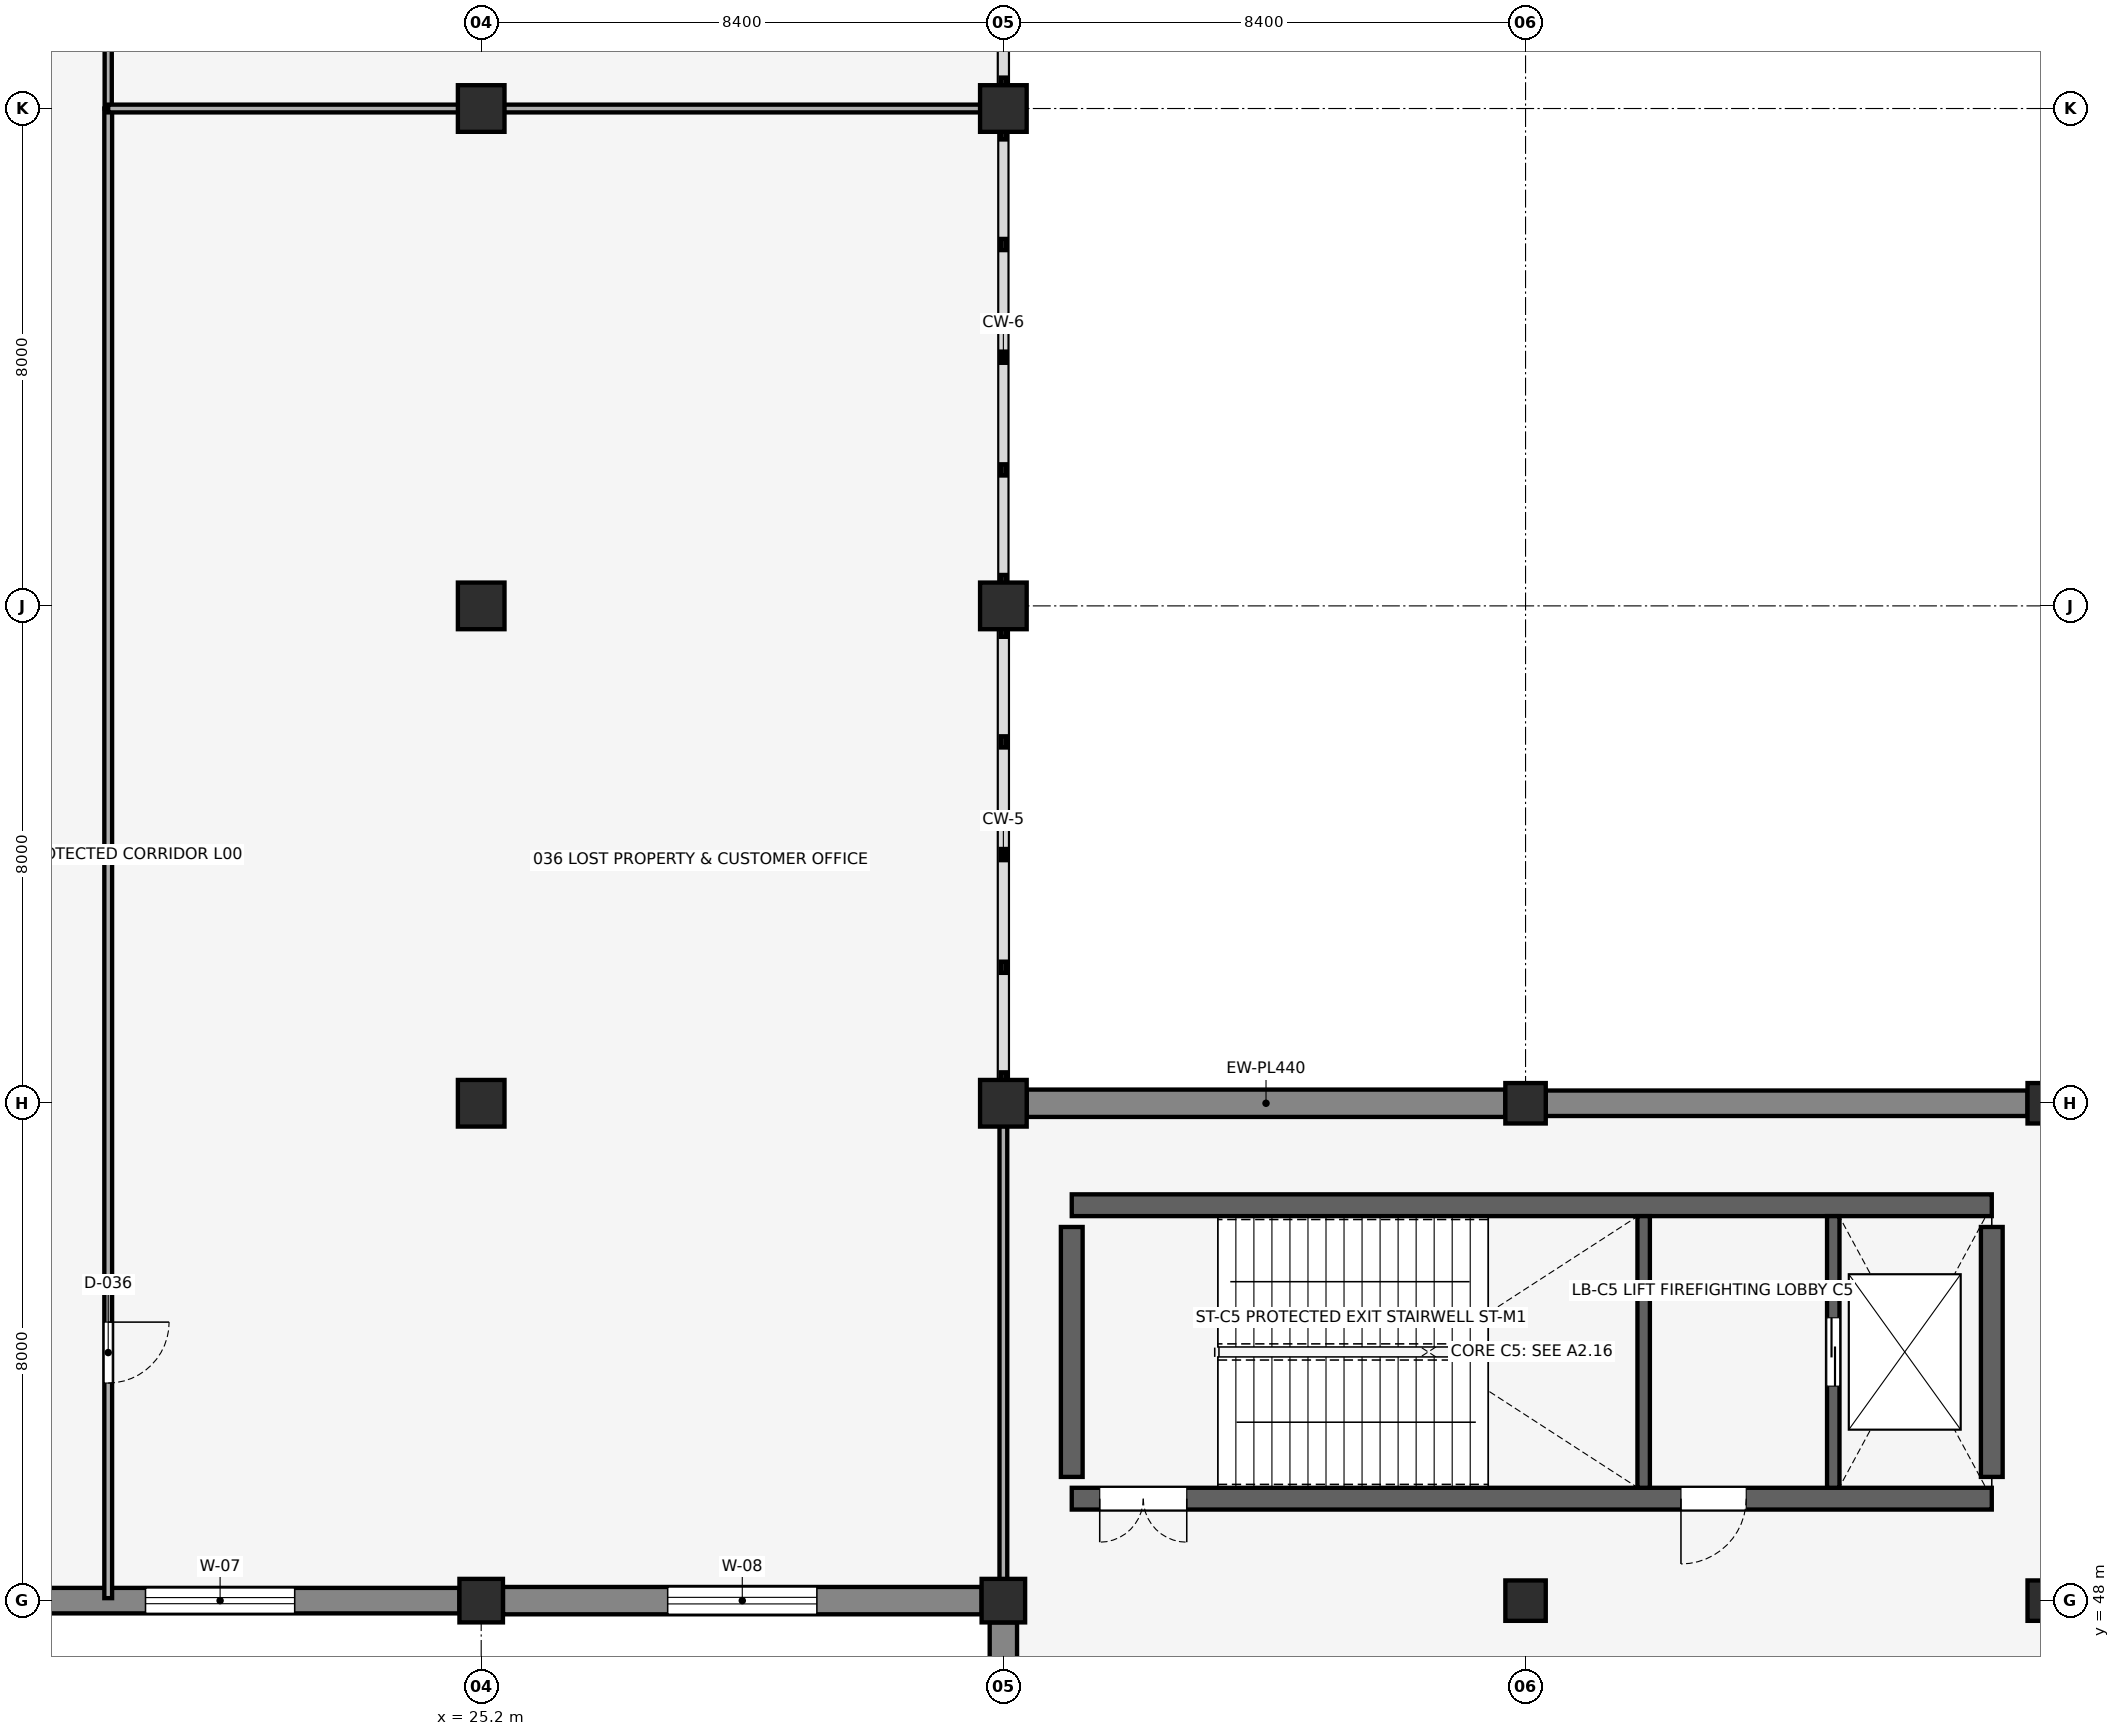
"""IFC4 building model, lengths in metres.
Left out: names, types, materials, properties, quantities, classifications, styles, units other than length and angle.
Written with IfcOpenShell. Run it as: python <this file> out.ifc"""

import sys

from ifc_helpers import new_model, si_unit, direction, frame, frame_2d, origin, origin_2d, place, context, subcontext, project, spatial, rectangle, circle, extrude, element, fill, save


model = new_model("IFC4")
c1 = context("Model", 3, precision=1e-05, world=origin(), true_north=direction((0.0, 1.0)))
c2 = subcontext(c1, "Body", "Model", "MODEL_VIEW")
j1 = project(units=[si_unit("LENGTHUNIT", "METRE"), si_unit("PLANEANGLEUNIT", "RADIAN")], contexts=[c1])
p1 = place(None, origin())
s1 = spatial("IfcSite", under=j1, at=p1, CompositionType="ELEMENT")
p2 = place(p1, origin())
s2 = spatial("IfcBuilding", under=s1, at=p2, CompositionType="ELEMENT")
p3 = place(p2, origin())
s3 = spatial("IfcBuildingStorey", under=s2, at=p3, CompositionType="ELEMENT", Elevation=0.0)
p4 = place(p3, frame((34.7, 49.64, 0.0), z_axis=(0.0, 0.0, 1.0), x_axis=(1.0, 0.0, 0.0)))
e1 = element("IfcWall", 1, at=p4, inside=s3, PredefinedType="SHEAR", context=c2, shape_type="SweptSolid", body=[
    extrude(rectangle(XDim=14.8, YDim=0.35, at=frame_2d((7.4, 0.0))), origin(), (0.0, 0.0, 1.0), 5.15),
])
p5 = place(p4, frame((1.85, 0.0, 0.0), z_axis=(0.0, 0.0, 1.0), x_axis=(-1.0, 0.0, 0.0)))
e2 = element("IfcOpeningElement", 2, at=p5, cuts=e1, PredefinedType="OPENING", context=c2, shape_type="SweptSolid", body=[
    extrude(rectangle(XDim=1.4, YDim=2.15, at=frame_2d((0.7, 1.075))), frame((0.0, 0.185, 0.0), z_axis=(0.0, -1.0, 0.0), x_axis=(1.0, 0.0, 0.0)), (0.0, 0.0, 1.0), 0.37),
])
p6 = place(p4, frame((10.85, 0.0, 0.0), z_axis=(0.0, 0.0, 1.0), x_axis=(-1.0, 0.0, 0.0)))
e3 = element("IfcOpeningElement", 3, at=p6, cuts=e1, PredefinedType="OPENING", context=c2, shape_type="SweptSolid", body=[
    extrude(rectangle(XDim=1.05, YDim=2.15, at=frame_2d((0.525, 1.075))), frame((0.0, 0.185, 0.0), z_axis=(0.0, -1.0, 0.0), x_axis=(1.0, 0.0, 0.0)), (0.0, 0.0, 1.0), 0.37),
])
p7 = place(p3, frame((34.7, 54.36, 0.0), z_axis=(0.0, 0.0, 1.0), x_axis=(1.0, 0.0, 0.0)))
e4 = element("IfcWall", 4, at=p7, inside=s3, PredefinedType="SHEAR", context=c2, shape_type="SweptSolid", body=[
    extrude(rectangle(XDim=14.8, YDim=0.35, at=frame_2d((7.4, 0.0))), origin(), (0.0, 0.0, 1.0), 5.15),
])
for number, where, z_axis, x_axis in (
    (5, (34.7, 49.99, 0.0), (0.0, 0.0, 1.0), (0.0, 1.0, 0.0)),
    (6, (49.5, 49.99, 0.0), (0.0, 0.0, 1.0), (0.0, 1.0, 0.0)),
):
    element("IfcWall", number, at=place(p3, frame(where, z_axis=z_axis, x_axis=x_axis)), inside=s3, PredefinedType="SHEAR", context=c2, shape_type="SweptSolid", body=[
        extrude(rectangle(XDim=4.02, YDim=0.35, at=frame_2d((2.01, 0.0))), origin(), (0.0, 0.0, 1.0), 5.15),
    ])
p8 = place(p3, frame((25.2, 48.0, 0.0), z_axis=(0.0, 0.0, 1.0), x_axis=(1.0, 0.0, 0.0)))
e7 = element("IfcColumn", 7, at=p8, inside=s3, PredefinedType="COLUMN", context=c2, shape_type="SweptSolid", body=[
    extrude(rectangle(XDim=0.7, YDim=0.7, at=origin_2d()), origin(), (0.0, 0.0, 1.0), 5.15),
])
for number, where, z_axis, x_axis in (
    (8, (25.2, 56.0, 0.0), (0.0, 0.0, 1.0), (1.0, 0.0, 0.0)),
    (9, (25.2, 64.0, 0.0), (0.0, 0.0, 1.0), (1.0, 0.0, 0.0)),
    (10, (25.2, 72.0, 0.0), (0.0, 0.0, 1.0), (1.0, 0.0, 0.0)),
):
    element("IfcColumn", number, at=place(p3, frame(where, z_axis=z_axis, x_axis=x_axis)), inside=s3, PredefinedType="COLUMN", context=c2, shape_type="SweptSolid", body=[
        extrude(rectangle(XDim=0.75, YDim=0.75, at=origin_2d()), origin(), (0.0, 0.0, 1.0), 5.15),
    ])
p9 = place(p3, frame((33.6, 48.0, 0.0), z_axis=(0.0, 0.0, 1.0), x_axis=(1.0, 0.0, 0.0)))
e11 = element("IfcColumn", 11, at=p9, inside=s3, PredefinedType="COLUMN", context=c2, shape_type="SweptSolid", body=[
    extrude(rectangle(XDim=0.7, YDim=0.7, at=origin_2d()), origin(), (0.0, 0.0, 1.0), 5.15),
])
for number, where, z_axis, x_axis in (
    (12, (33.6, 56.0, 0.0), (0.0, 0.0, 1.0), (1.0, 0.0, 0.0)),
    (13, (33.6, 64.0, 0.0), (0.0, 0.0, 1.0), (1.0, 0.0, 0.0)),
    (14, (33.6, 72.0, 0.0), (0.0, 0.0, 1.0), (1.0, 0.0, 0.0)),
):
    element("IfcColumn", number, at=place(p3, frame(where, z_axis=z_axis, x_axis=x_axis)), inside=s3, PredefinedType="COLUMN", context=c2, shape_type="SweptSolid", body=[
        extrude(rectangle(XDim=0.75, YDim=0.75, at=origin_2d()), origin(), (0.0, 0.0, 1.0), 5.15),
    ])
for number, where, z_axis, x_axis in (
    (15, (42.0, 48.0, 0.0), (0.0, 0.0, 1.0), (1.0, 0.0, 0.0)),
    (16, (42.0, 56.0, 0.0), (0.0, 0.0, 1.0), (1.0, 0.0, 0.0)),
    (17, (50.4, 48.0, 0.0), (0.0, 0.0, 1.0), (1.0, 0.0, 0.0)),
    (18, (50.4, 56.0, 0.0), (0.0, 0.0, 1.0), (1.0, 0.0, 0.0)),
):
    element("IfcColumn", number, at=place(p3, frame(where, z_axis=z_axis, x_axis=x_axis)), inside=s3, PredefinedType="COLUMN", context=c2, shape_type="SweptSolid", body=[
        extrude(circle(Radius=0.325, at=origin_2d()), origin(), (0.0, 0.0, 1.0), 5.15),
    ])
p10 = place(p3, frame((33.6, 40.325, 0.0), z_axis=(0.0, 0.0, 1.0), x_axis=(0.0, 1.0, 0.0)))
e19 = element("IfcWall", 19, at=p10, inside=s3, PredefinedType="SOLIDWALL", context=c2, shape_type="SweptSolid", body=[
    extrude(rectangle(XDim=7.325, YDim=0.44, at=frame_2d((3.663, 0.0))), origin(), (0.0, 0.0, 1.0), 4.747),
])
p11 = place(p10, frame((2.163, 0.0, 0.9), z_axis=(0.0, 0.0, 1.0), x_axis=(1.0, 0.0, 0.0)))
e20 = element("IfcOpeningElement", 20, at=p11, cuts=e19, PredefinedType="OPENING", context=c2, shape_type="SweptSolid", body=[
    extrude(rectangle(XDim=3.0, YDim=1.65, at=frame_2d((1.5, 0.825))), frame((0.0, 0.23, 0.0), z_axis=(0.0, -1.0, 0.0), x_axis=(1.0, 0.0, 0.0)), (0.0, 0.0, 1.0), 0.46),
])
p12 = place(p3, frame((17.15, 48.0, 0.0), z_axis=(0.0, 0.0, 1.0), x_axis=(1.0, 0.0, 0.0)))
e21 = element("IfcWall", 21, at=p12, inside=s3, PredefinedType="SOLIDWALL", context=c2, shape_type="SweptSolid", body=[
    extrude(rectangle(XDim=7.7, YDim=0.41, at=frame_2d((3.85, 0.0))), origin(), (0.0, 0.0, 1.0), 4.74),
])
p13 = place(p12, frame((2.65, 0.0, 0.9), z_axis=(0.0, 0.0, 1.0), x_axis=(1.0, 0.0, 0.0)))
e22 = element("IfcOpeningElement", 22, at=p13, cuts=e21, PredefinedType="OPENING", context=c2, shape_type="SweptSolid", body=[
    extrude(rectangle(XDim=2.4, YDim=1.75, at=frame_2d((1.2, 0.875))), frame((0.0, 0.215, 0.0), z_axis=(0.0, -1.0, 0.0), x_axis=(1.0, 0.0, 0.0)), (0.0, 0.0, 1.0), 0.43),
])
p14 = place(p3, frame((25.55, 48.0, 0.0), z_axis=(0.0, 0.0, 1.0), x_axis=(1.0, 0.0, 0.0)))
e23 = element("IfcWall", 23, at=p14, inside=s3, PredefinedType="SOLIDWALL", context=c2, shape_type="SweptSolid", body=[
    extrude(rectangle(XDim=7.7, YDim=0.44, at=frame_2d((3.85, 0.0))), origin(), (0.0, 0.0, 1.0), 4.74),
])
p15 = place(p14, frame((2.65, 0.0, 0.9), z_axis=(0.0, 0.0, 1.0), x_axis=(1.0, 0.0, 0.0)))
e24 = element("IfcOpeningElement", 24, at=p15, cuts=e23, PredefinedType="OPENING", context=c2, shape_type="SweptSolid", body=[
    extrude(rectangle(XDim=2.4, YDim=1.5, at=frame_2d((1.2, 0.75))), frame((0.0, 0.23, 0.0), z_axis=(0.0, -1.0, 0.0), x_axis=(1.0, 0.0, 0.0)), (0.0, 0.0, 1.0), 0.46),
])
p16 = place(p3, frame((33.975, 56.0, 0.0), z_axis=(0.0, 0.0, 1.0), x_axis=(1.0, 0.0, 0.0)))
e25 = element("IfcWall", 25, at=p16, inside=s3, PredefinedType="SOLIDWALL", context=c2, shape_type="SweptSolid", body=[
    extrude(rectangle(XDim=7.7, YDim=0.44, at=frame_2d((3.85, 0.0))), origin(), (0.0, 0.0, 1.0), 4.74),
])
p17 = place(p3, frame((42.325, 56.0, 0.0), z_axis=(0.0, 0.0, 1.0), x_axis=(1.0, 0.0, 0.0)))
e26 = element("IfcWall", 26, at=p17, inside=s3, PredefinedType="SOLIDWALL", context=c2, shape_type="SweptSolid", body=[
    extrude(rectangle(XDim=7.75, YDim=0.41, at=frame_2d((3.875, 0.0))), origin(), (0.0, 0.0, 1.0), 4.74),
])
p18 = place(p3, frame((43.9, 49.815, 0.0), z_axis=(0.0, 0.0, 1.0), x_axis=(0.0, 1.0, 0.0)))
e27 = element("IfcWall", 27, at=p18, inside=s3, PredefinedType="SHEAR", context=c2, shape_type="SweptSolid", body=[
    extrude(rectangle(XDim=4.37, YDim=0.2, at=frame_2d((2.185, 0.0))), origin(), (0.0, 0.0, 1.0), 5.15),
])
p19 = place(p3, frame((46.95, 49.815, 0.0), z_axis=(0.0, 0.0, 1.0), x_axis=(0.0, 1.0, 0.0)))
e28 = element("IfcWall", 28, at=p19, inside=s3, PredefinedType="SHEAR", context=c2, shape_type="SweptSolid", body=[
    extrude(rectangle(XDim=4.37, YDim=0.2, at=frame_2d((2.185, 0.0))), origin(), (0.0, 0.0, 1.0), 5.15),
])
p20 = place(p19, frame((1.635, 0.0, 0.0), z_axis=(0.0, 0.0, 1.0), x_axis=(1.0, 0.0, 0.0)))
e29 = element("IfcOpeningElement", 29, at=p20, cuts=e28, PredefinedType="OPENING", context=c2, shape_type="SweptSolid", body=[
    extrude(rectangle(XDim=1.1, YDim=2.15, at=frame_2d((0.55, 1.075))), frame((0.0, 0.11, 0.0), z_axis=(0.0, -1.0, 0.0), x_axis=(1.0, 0.0, 0.0)), (0.0, 0.0, 1.0), 0.22),
])
p21 = place(p3, frame((19.2, 48.04, 0.0), z_axis=(0.0, 0.0, 1.0), x_axis=(0.0, 1.0, 0.0)))
e30 = element("IfcWall", 30, at=p21, inside=s3, PredefinedType="PARTITIONING", context=c2, shape_type="SweptSolid", body=[
    extrude(rectangle(XDim=23.96, YDim=0.125, at=frame_2d((11.98, 0.0))), origin(), (0.0, 0.0, 1.0), 5.15),
])
p22 = place(p21, frame((4.44, 0.0, 0.0), z_axis=(0.0, 0.0, 1.0), x_axis=(-1.0, 0.0, 0.0)))
e31 = element("IfcOpeningElement", 31, at=p22, cuts=e30, PredefinedType="OPENING", context=c2, shape_type="SweptSolid", body=[
    extrude(rectangle(XDim=0.98, YDim=2.15, at=frame_2d((0.49, 1.075))), frame((0.0, 0.073, 0.0), z_axis=(0.0, -1.0, 0.0), x_axis=(1.0, 0.0, 0.0)), (0.0, 0.0, 1.0), 0.145),
])
p23 = place(p3, frame((19.2, 72.0, 0.0), z_axis=(0.0, 0.0, 1.0), x_axis=(0.0, 1.0, 0.0)))
e32 = element("IfcWall", 32, at=p23, inside=s3, PredefinedType="PARTITIONING", context=c2, shape_type="SweptSolid", body=[
    extrude(rectangle(XDim=16.0, YDim=0.115, at=frame_2d((8.0, 0.0))), origin(), (0.0, 0.0, 1.0), 5.15),
])
p24 = place(p23, frame((4.45, 0.0, 0.0), z_axis=(0.0, 0.0, 1.0), x_axis=(-1.0, 0.0, 0.0)))
e33 = element("IfcOpeningElement", 33, at=p24, cuts=e32, PredefinedType="OPENING", context=c2, shape_type="SweptSolid", body=[
    extrude(rectangle(XDim=0.95, YDim=2.15, at=frame_2d((0.475, 1.075))), frame((0.0, 0.067, 0.0), z_axis=(0.0, -1.0, 0.0), x_axis=(1.0, 0.0, 0.0)), (0.0, 0.0, 1.0), 0.135),
])
p25 = place(p3, frame((33.6, 48.34, 0.0), z_axis=(0.0, 0.0, 1.0), x_axis=(0.0, 1.0, 0.0)))
e34 = element("IfcWall", 34, at=p25, inside=s3, PredefinedType="PARTITIONING", context=c2, shape_type="SweptSolid", body=[
    extrude(rectangle(XDim=7.295, YDim=0.125, at=frame_2d((3.647, 0.0))), origin(), (0.0, 0.0, 1.0), 4.542),
])
p26 = place(p3, frame((19.2, 72.0, 0.0), z_axis=(0.0, 0.0, 1.0), x_axis=(1.0, 0.0, 0.0)))
e35 = element("IfcWall", 35, at=p26, inside=s3, PredefinedType="PARTITIONING", context=c2, shape_type="SweptSolid", body=[
    extrude(rectangle(XDim=5.635, YDim=0.125, at=frame_2d((2.817, 0.0))), origin(), (0.0, 0.0, 1.0), 4.605),
])
p27 = place(p3, frame((25.565, 72.0, 0.0), z_axis=(0.0, 0.0, 1.0), x_axis=(1.0, 0.0, 0.0)))
e36 = element("IfcWall", 36, at=p27, inside=s3, PredefinedType="PARTITIONING", context=c2, shape_type="SweptSolid", body=[
    extrude(rectangle(XDim=7.67, YDim=0.125, at=frame_2d((3.835, 0.0))), origin(), (0.0, 0.0, 1.0), 4.605),
])
p28 = place(p13, origin())
e37 = element("IfcWindow", 37, at=p28, inside=s3, PartitioningType="DOUBLE_PANEL_VERTICAL", PredefinedType="WINDOW", context=c2, shape_type="SweptSolid", body=[
    extrude(rectangle(XDim=2.4, YDim=1.75, at=frame_2d((1.2, 0.875))), frame((0.0, 0.03, 0.0), z_axis=(0.0, -1.0, 0.0), x_axis=(1.0, 0.0, 0.0)), (0.0, 0.0, 1.0), 0.06),
])
fill(e22, e37)
p29 = place(p15, origin())
e38 = element("IfcWindow", 38, at=p29, inside=s3, PartitioningType="DOUBLE_PANEL_VERTICAL", PredefinedType="WINDOW", context=c2, shape_type="SweptSolid", body=[
    extrude(rectangle(XDim=2.4, YDim=1.5, at=frame_2d((1.2, 0.75))), frame((0.0, 0.03, 0.0), z_axis=(0.0, -1.0, 0.0), x_axis=(1.0, 0.0, 0.0)), (0.0, 0.0, 1.0), 0.06),
])
fill(e24, e38)
p30 = place(p5, origin())
e39 = element("IfcDoor", 39, at=p30, inside=s3, OperationType="DOUBLE_DOOR_SINGLE_SWING", PredefinedType="DOOR", context=c2, shape_type="SweptSolid", body=[
    extrude(rectangle(XDim=1.4, YDim=2.15, at=frame_2d((0.7, 1.075))), frame((0.0, 0.025, 0.0), z_axis=(0.0, -1.0, 0.0), x_axis=(1.0, 0.0, 0.0)), (0.0, 0.0, 1.0), 0.05),
])
fill(e2, e39)
p31 = place(p6, origin())
e40 = element("IfcDoor", 40, at=p31, inside=s3, OperationType="SINGLE_SWING_RIGHT", PredefinedType="DOOR", context=c2, shape_type="SweptSolid", body=[
    extrude(rectangle(XDim=1.05, YDim=2.15, at=frame_2d((0.525, 1.075))), frame((0.0, 0.025, 0.0), z_axis=(0.0, -1.0, 0.0), x_axis=(1.0, 0.0, 0.0)), (0.0, 0.0, 1.0), 0.05),
])
fill(e3, e40)
p32 = place(p20, origin())
e41 = element("IfcDoor", 41, at=p32, inside=s3, OperationType="DOUBLE_DOOR_SLIDING", PredefinedType="DOOR", context=c2, shape_type="SweptSolid", body=[
    extrude(rectangle(XDim=1.1, YDim=2.15, at=frame_2d((0.55, 1.075))), frame((0.0, 0.025, 0.0), z_axis=(0.0, -1.0, 0.0), x_axis=(1.0, 0.0, 0.0)), (0.0, 0.0, 1.0), 0.05),
])
fill(e29, e41)
p33 = place(p22, origin())
e42 = element("IfcDoor", 42, at=p33, inside=s3, OperationType="SINGLE_SWING_LEFT", PredefinedType="DOOR", context=c2, shape_type="SweptSolid", body=[
    extrude(rectangle(XDim=0.98, YDim=2.15, at=frame_2d((0.49, 1.075))), frame((0.0, 0.025, 0.0), z_axis=(0.0, -1.0, 0.0), x_axis=(1.0, 0.0, 0.0)), (0.0, 0.0, 1.0), 0.05),
])
fill(e31, e42)
save(model, sys.argv[1])
